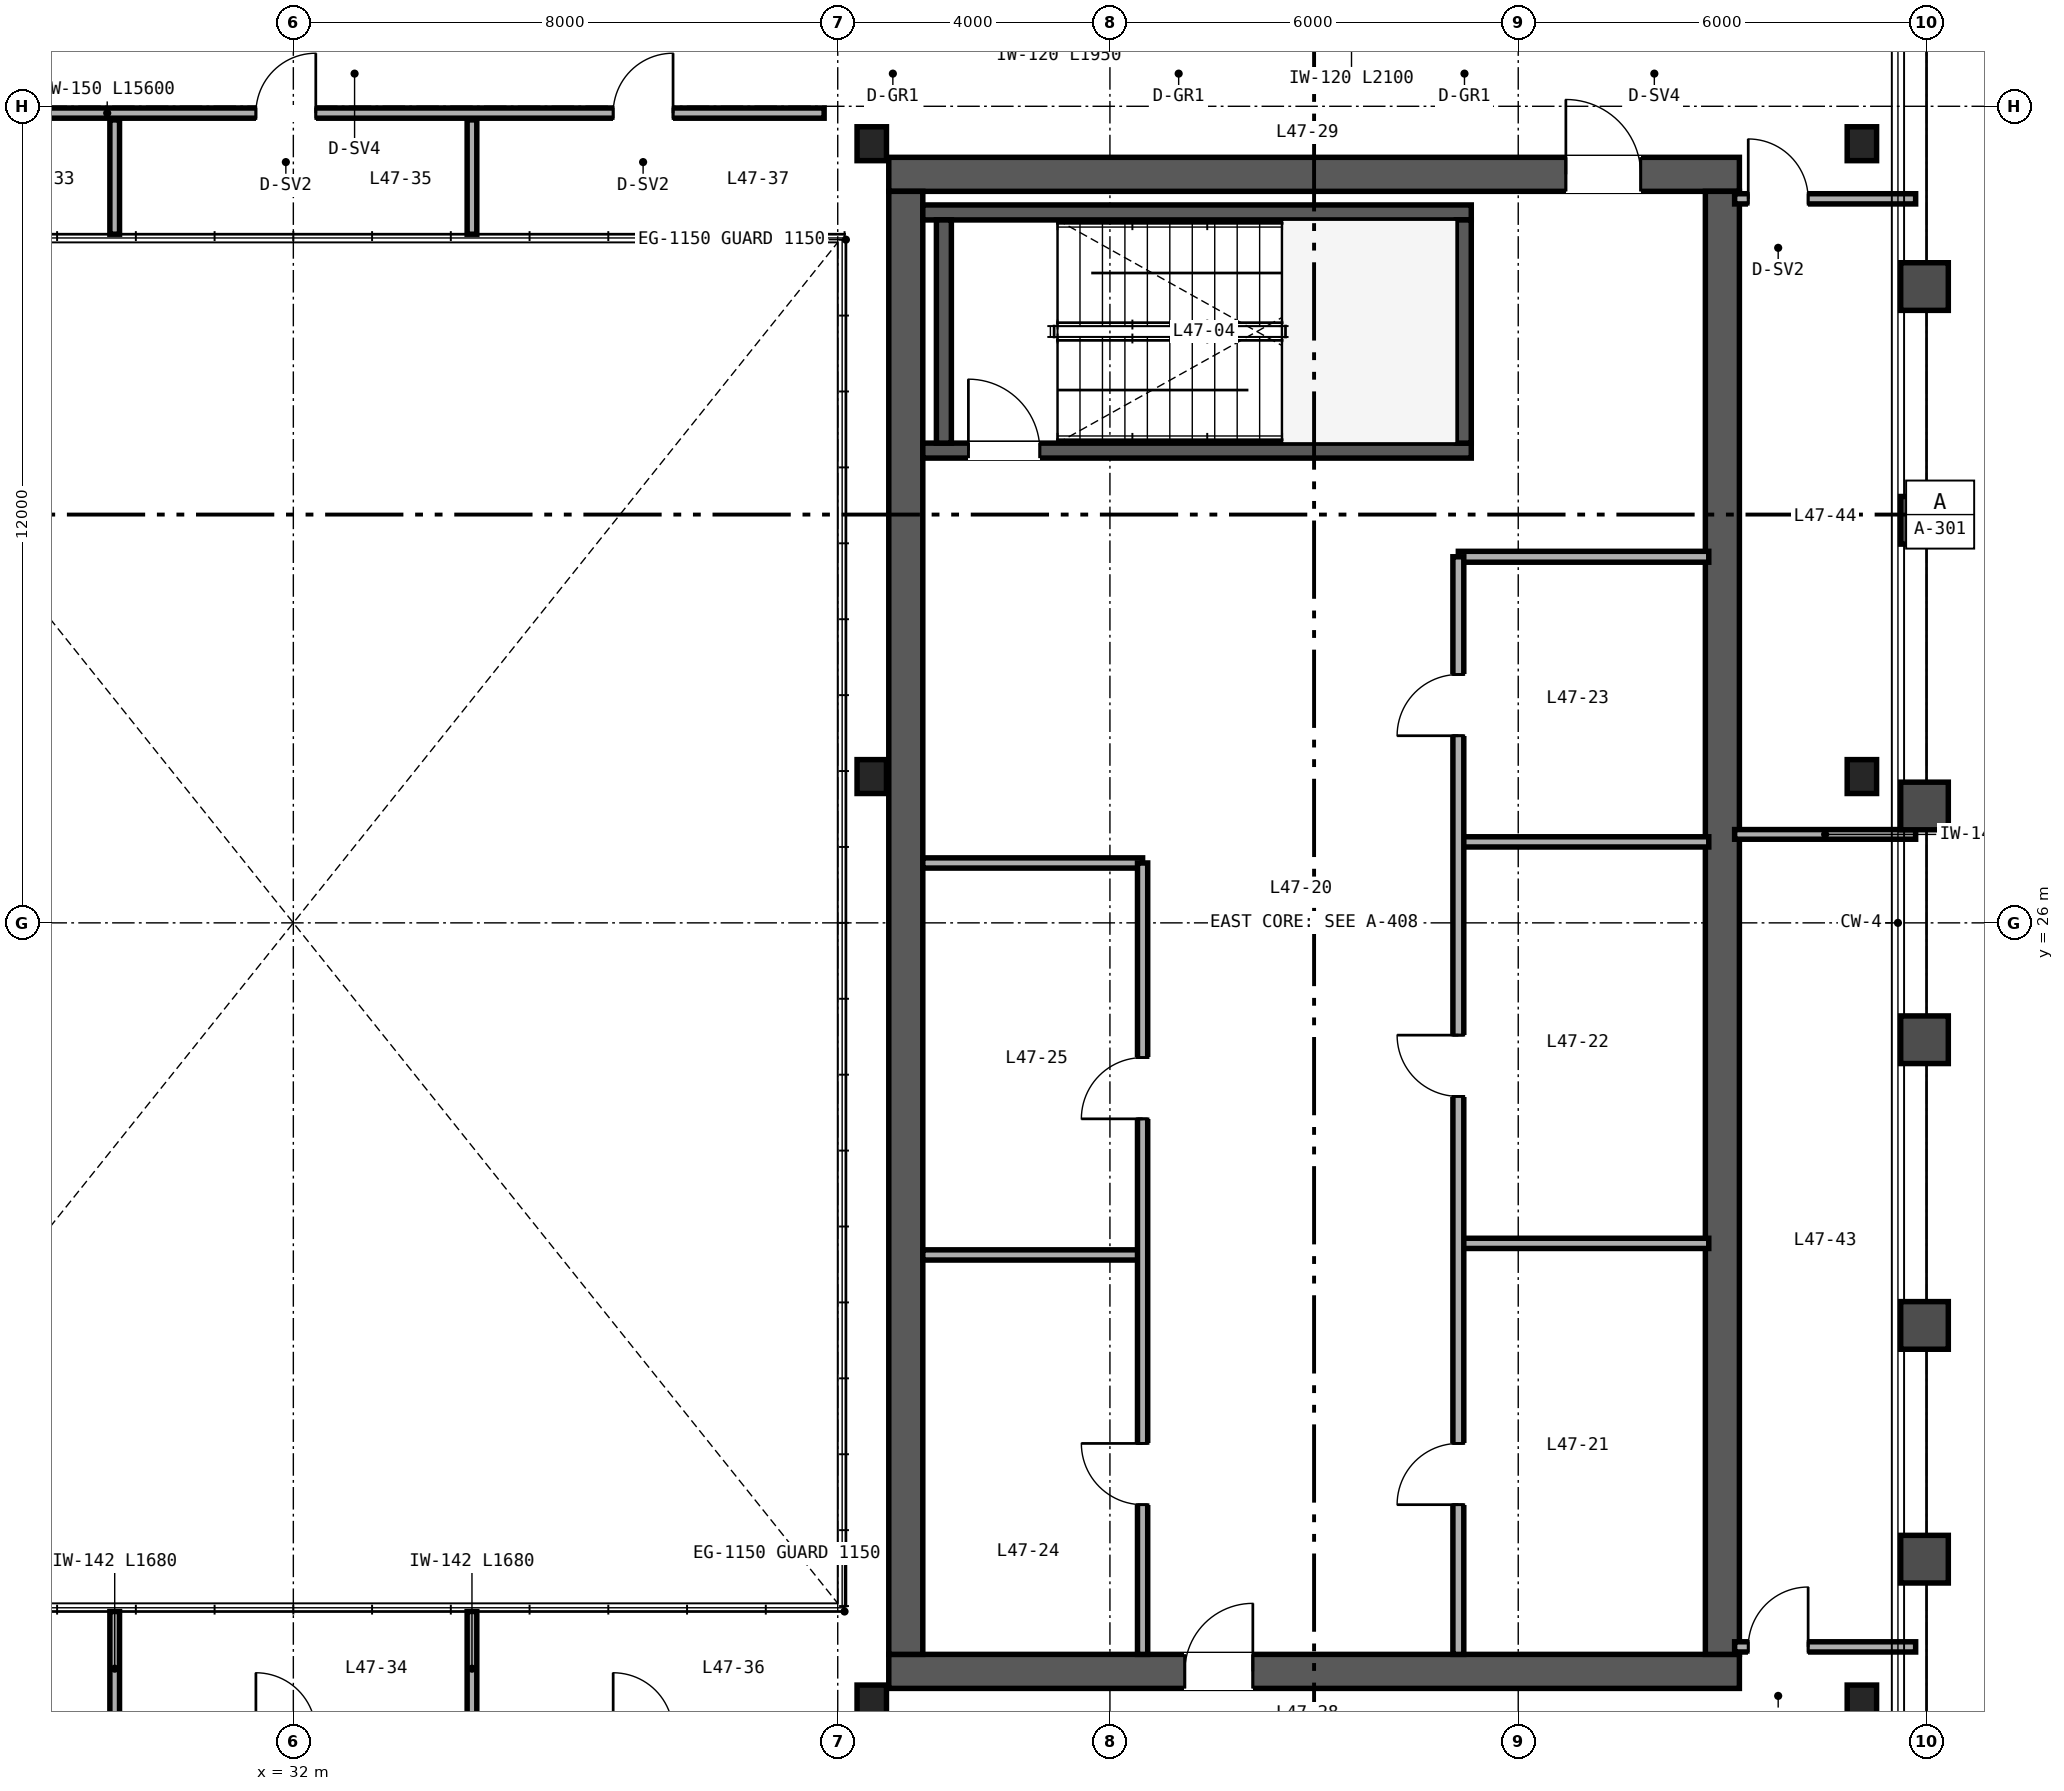
"""IFC4 building model, lengths in metres.
Left out: names, types, materials, properties, quantities, classifications, styles, units other than length and angle.
Written with IfcOpenShell. Run it as: python <this file> out.ifc"""

import sys

from ifc_helpers import new_model, si_unit, direction, frame, frame_2d, origin, origin_2d, place, context, subcontext, project, spatial, rectangle, i_section, extrude, source, transform, mapped, element, fill, save


model = new_model("IFC4")
c1 = context("Model", 3, precision=1e-05, world=origin(), true_north=direction((0.0, 1.0)))
c2 = subcontext(c1, "Body", "Model", "MODEL_VIEW")
j1 = project(units=[si_unit("LENGTHUNIT", "METRE"), si_unit("PLANEANGLEUNIT", "RADIAN")], contexts=[c1])
p1 = place(None, origin())
s1 = spatial("IfcSite", under=j1, at=p1, CompositionType="ELEMENT")
p2 = place(p1, origin())
s2 = spatial("IfcBuilding", under=s1, at=p2, CompositionType="ELEMENT")
p3 = place(p2, frame((0.0, 0.0, 188.4)))
s3 = spatial("IfcBuildingStorey", under=s2, at=p3, CompositionType="ELEMENT", Elevation=188.4)
p4 = place(p3, frame((40.75, 15.0, 0.0), z_axis=(0.0, 0.0, 1.0), x_axis=(1.0, 0.0, 0.0)))
e1 = element("IfcWall", 1, at=p4, inside=s3, PredefinedType="SHEAR", context=c2, shape_type="SweptSolid", body=[
    extrude(rectangle(XDim=12.5, YDim=0.5, at=frame_2d((6.25, 0.0))), origin(), (0.0, 0.0, 1.0), 3.37),
])
p5 = place(p4, frame((4.35, 0.0, 0.0)))
e2 = element("IfcOpeningElement", 2, at=p5, cuts=e1, PredefinedType="OPENING", context=c2, shape_type="SweptSolid", body=[
    extrude(rectangle(XDim=1.0, YDim=2.15, at=frame_2d((0.5, 1.075))), frame((0.0, 0.26, 0.0), z_axis=(0.0, -1.0, 0.0), x_axis=(1.0, 0.0, 0.0)), (0.0, 0.0, 1.0), 0.52),
])
p6 = place(p3, frame((40.75, 37.0, 0.0), z_axis=(0.0, 0.0, 1.0), x_axis=(1.0, 0.0, 0.0)))
e3 = element("IfcWall", 3, at=p6, inside=s3, PredefinedType="SHEAR", context=c2, shape_type="SweptSolid", body=[
    extrude(rectangle(XDim=12.5, YDim=0.5, at=frame_2d((6.25, 0.0))), origin(), (0.0, 0.0, 1.0), 3.37),
])
p7 = place(p6, frame((9.95, 0.0, 0.0)))
e4 = element("IfcOpeningElement", 4, at=p7, cuts=e3, PredefinedType="OPENING", context=c2, shape_type="SweptSolid", body=[
    extrude(rectangle(XDim=1.1, YDim=2.15, at=frame_2d((0.55, 1.075))), frame((0.0, 0.26, 0.0), z_axis=(0.0, -1.0, 0.0), x_axis=(1.0, 0.0, 0.0)), (0.0, 0.0, 1.0), 0.52),
])
for number, where, z_axis, x_axis in (
    (5, (41.0, 15.25, 0.0), (0.0, 0.0, 1.0), (0.0, 1.0, 0.0)),
    (6, (53.0, 15.25, 0.0), (0.0, 0.0, 1.0), (0.0, 1.0, 0.0)),
):
    element("IfcWall", number, at=place(p3, frame(where, z_axis=z_axis, x_axis=x_axis)), inside=s3, PredefinedType="SHEAR", context=c2, shape_type="SweptSolid", body=[
        extrude(rectangle(XDim=21.5, YDim=0.5, at=frame_2d((10.75, 0.0))), origin(), (0.0, 0.0, 1.0), 3.37),
    ])
p8 = place(p3, frame((41.25, 32.94, 0.0), z_axis=(0.0, 0.0, 1.0), x_axis=(1.0, 0.0, 0.0)))
e7 = element("IfcWall", 7, at=p8, inside=s3, PredefinedType="SHEAR", context=c2, shape_type="SweptSolid", body=[
    extrude(rectangle(XDim=8.06, YDim=0.22, at=frame_2d((4.03, 0.0))), origin(), (0.0, 0.0, 1.0), 3.4),
])
p9 = place(p8, frame((0.67, 0.0, 0.0)))
e8 = element("IfcOpeningElement", 8, at=p9, cuts=e7, PredefinedType="OPENING", context=c2, shape_type="SweptSolid", body=[
    extrude(rectangle(XDim=1.05, YDim=2.15, at=frame_2d((0.525, 1.075))), frame((0.0, 0.12, 0.0), z_axis=(0.0, -1.0, 0.0), x_axis=(1.0, 0.0, 0.0)), (0.0, 0.0, 1.0), 0.24),
])
p10 = place(p3, frame((41.25, 36.44, 0.0), z_axis=(0.0, 0.0, 1.0), x_axis=(1.0, 0.0, 0.0)))
e9 = element("IfcWall", 9, at=p10, inside=s3, PredefinedType="SHEAR", context=c2, shape_type="SweptSolid", body=[
    extrude(rectangle(XDim=8.06, YDim=0.22, at=frame_2d((4.03, 0.0))), origin(), (0.0, 0.0, 1.0), 3.4),
])
for number, where, z_axis, x_axis in (
    (10, (41.56, 33.05, 0.0), (0.0, 0.0, 1.0), (0.0, 1.0, 0.0)),
    (11, (49.2, 33.05, 0.0), (0.0, 0.0, 1.0), (0.0, 1.0, 0.0)),
):
    element("IfcWall", number, at=place(p3, frame(where, z_axis=z_axis, x_axis=x_axis)), inside=s3, PredefinedType="SHEAR", context=c2, shape_type="SweptSolid", body=[
        extrude(rectangle(XDim=3.28, YDim=0.22, at=frame_2d((1.64, 0.0))), origin(), (0.0, 0.0, 1.0), 3.4),
    ])
m1 = source(origin(), c2, "Body", "SweptSolid", [
    extrude(i_section(OverallWidth=0.432, OverallDepth=0.498, WebThickness=0.056, FlangeThickness=0.089, FilletRadius=0.025, at=origin_2d()), origin(), (0.0, 0.0, 1.0), 3.37),
])
for number, where, z_axis, x_axis in (
    (12, (40.5, 14.55, 0.0), (0.0, 0.0, 1.0), (1.0, 0.0, 0.0)),
    (13, (55.05, 14.55, 0.0), (0.0, 0.0, 1.0), (1.0, 0.0, 0.0)),
    (14, (40.5, 28.15, 0.0), (0.0, 0.0, 1.0), (1.0, 0.0, 0.0)),
    (15, (55.05, 28.15, 0.0), (0.0, 0.0, 1.0), (1.0, 0.0, 0.0)),
    (16, (40.5, 37.45, 0.0), (0.0, 0.0, 1.0), (1.0, 0.0, 0.0)),
    (17, (55.05, 37.45, 0.0), (0.0, 0.0, 1.0), (1.0, 0.0, 0.0)),
):
    element("IfcColumn", number, at=place(p3, frame(where, z_axis=z_axis, x_axis=x_axis)), inside=s3, PredefinedType="COLUMN", context=c2, shape_type="MappedRepresentation", body=[
        mapped(m1, transform((0.0, 0.0, 0.0), scale=1.0)),
    ])
p11 = place(p3, frame((49.12, 31.38, 0.0), z_axis=(0.0, 0.0, 1.0), x_axis=(1.0, 0.0, 0.0)))
e18 = element("IfcWall", 18, at=p11, inside=s3, PredefinedType="PARTITIONING", context=c2, shape_type="SweptSolid", body=[
    extrude(rectangle(XDim=3.68, YDim=0.16, at=frame_2d((1.84, 0.0))), origin(), (0.0, 0.0, 1.0), 2.47),
])
for number, where, z_axis, x_axis in (
    (19, (49.12, 21.29, 0.0), (0.0, 0.0, 1.0), (1.0, 0.0, 0.0)),
    (20, (49.12, 27.19, 0.0), (0.0, 0.0, 1.0), (1.0, 0.0, 0.0)),
):
    element("IfcWall", number, at=place(p3, frame(where, z_axis=z_axis, x_axis=x_axis)), inside=s3, PredefinedType="PARTITIONING", context=c2, shape_type="SweptSolid", body=[
        extrude(rectangle(XDim=3.68, YDim=0.15, at=frame_2d((1.84, 0.0))), origin(), (0.0, 0.0, 1.0), 3.37),
    ])
p12 = place(p3, frame((49.12, 15.25, 0.0), z_axis=(0.0, 0.0, 1.0), x_axis=(0.0, 1.0, 0.0)))
e21 = element("IfcWall", 21, at=p12, inside=s3, PredefinedType="PARTITIONING", context=c2, shape_type="SweptSolid", body=[
    extrude(rectangle(XDim=16.13, YDim=0.16, at=frame_2d((8.065, 0.0))), origin(), (0.0, 0.0, 1.0), 2.443),
])
p13 = place(p12, frame((2.2, 0.0, 0.0)))
e22 = element("IfcOpeningElement", 22, at=p13, cuts=e21, PredefinedType="OPENING", context=c2, shape_type="SweptSolid", body=[
    extrude(rectangle(XDim=0.9, YDim=2.15, at=frame_2d((0.45, 1.075))), frame((0.0, 0.09, 0.0), z_axis=(0.0, -1.0, 0.0), x_axis=(1.0, 0.0, 0.0)), (0.0, 0.0, 1.0), 0.18),
])
p14 = place(p12, frame((8.2, 0.0, 0.0)))
e23 = element("IfcOpeningElement", 23, at=p14, cuts=e21, PredefinedType="OPENING", context=c2, shape_type="SweptSolid", body=[
    extrude(rectangle(XDim=0.9, YDim=2.15, at=frame_2d((0.45, 1.075))), frame((0.0, 0.09, 0.0), z_axis=(0.0, -1.0, 0.0), x_axis=(1.0, 0.0, 0.0)), (0.0, 0.0, 1.0), 0.18),
])
p15 = place(p12, frame((13.5, 0.0, 0.0)))
e24 = element("IfcOpeningElement", 24, at=p15, cuts=e21, PredefinedType="OPENING", context=c2, shape_type="SweptSolid", body=[
    extrude(rectangle(XDim=0.9, YDim=2.15, at=frame_2d((0.45, 1.075))), frame((0.0, 0.09, 0.0), z_axis=(0.0, -1.0, 0.0), x_axis=(1.0, 0.0, 0.0)), (0.0, 0.0, 1.0), 0.18),
])
for number, where, z_axis, x_axis in (
    (25, (41.25, 26.88, 0.0), (0.0, 0.0, 1.0), (1.0, 0.0, 0.0)),
    (26, (41.25, 21.12, 0.0), (0.0, 0.0, 1.0), (1.0, 0.0, 0.0)),
):
    element("IfcWall", number, at=place(p3, frame(where, z_axis=z_axis, x_axis=x_axis)), inside=s3, PredefinedType="PARTITIONING", context=c2, shape_type="SweptSolid", body=[
        extrude(rectangle(XDim=3.23, YDim=0.15, at=frame_2d((1.615, 0.0))), origin(), (0.0, 0.0, 1.0), 3.37),
    ])
p16 = place(p3, frame((44.48, 15.25, 0.0), z_axis=(0.0, 0.0, 1.0), x_axis=(0.0, 1.0, 0.0)))
e27 = element("IfcWall", 27, at=p16, inside=s3, PredefinedType="PARTITIONING", context=c2, shape_type="SweptSolid", body=[
    extrude(rectangle(XDim=11.63, YDim=0.15, at=frame_2d((5.815, 0.0))), origin(), (0.0, 0.0, 1.0), 3.37),
])
p17 = place(p16, frame((2.2, 0.0, 0.0)))
e28 = element("IfcOpeningElement", 28, at=p17, cuts=e27, PredefinedType="OPENING", context=c2, shape_type="SweptSolid", body=[
    extrude(rectangle(XDim=0.9, YDim=2.15, at=frame_2d((0.45, 1.075))), frame((0.0, 0.085, 0.0), z_axis=(0.0, -1.0, 0.0), x_axis=(1.0, 0.0, 0.0)), (0.0, 0.0, 1.0), 0.17),
])
p18 = place(p16, frame((7.87, 0.0, 0.0)))
e29 = element("IfcOpeningElement", 29, at=p18, cuts=e27, PredefinedType="OPENING", context=c2, shape_type="SweptSolid", body=[
    extrude(rectangle(XDim=0.9, YDim=2.15, at=frame_2d((0.45, 1.075))), frame((0.0, 0.085, 0.0), z_axis=(0.0, -1.0, 0.0), x_axis=(1.0, 0.0, 0.0)), (0.0, 0.0, 1.0), 0.17),
])
p19 = place(p3, frame((24.2, 37.9, 0.0), z_axis=(0.0, 0.0, 1.0), x_axis=(1.0, 0.0, 0.0)))
e30 = element("IfcWall", 30, at=p19, inside=s3, PredefinedType="PARTITIONING", context=c2, shape_type="SweptSolid", body=[
    extrude(rectangle(XDim=15.6, YDim=0.15, at=frame_2d((7.8, 0.0))), origin(), (0.0, 0.0, 1.0), 3.37),
])
p20 = place(p19, frame((2.0, 0.0, 0.0)))
e31 = element("IfcOpeningElement", 31, at=p20, cuts=e30, PredefinedType="OPENING", context=c2, shape_type="SweptSolid", body=[
    extrude(rectangle(XDim=0.88, YDim=2.15, at=frame_2d((0.44, 1.075))), frame((0.0, 0.085, 0.0), z_axis=(0.0, -1.0, 0.0), x_axis=(1.0, 0.0, 0.0)), (0.0, 0.0, 1.0), 0.17),
])
p21 = place(p19, frame((7.25, 0.0, 0.0)))
e32 = element("IfcOpeningElement", 32, at=p21, cuts=e30, PredefinedType="OPENING", context=c2, shape_type="SweptSolid", body=[
    extrude(rectangle(XDim=0.88, YDim=2.15, at=frame_2d((0.44, 1.075))), frame((0.0, 0.085, 0.0), z_axis=(0.0, -1.0, 0.0), x_axis=(1.0, 0.0, 0.0)), (0.0, 0.0, 1.0), 0.17),
])
p22 = place(p19, frame((12.5, 0.0, 0.0)))
e33 = element("IfcOpeningElement", 33, at=p22, cuts=e30, PredefinedType="OPENING", context=c2, shape_type="SweptSolid", body=[
    extrude(rectangle(XDim=0.88, YDim=2.15, at=frame_2d((0.44, 1.075))), frame((0.0, 0.085, 0.0), z_axis=(0.0, -1.0, 0.0), x_axis=(1.0, 0.0, 0.0)), (0.0, 0.0, 1.0), 0.17),
])
for number, where, z_axis, x_axis in (
    (34, (29.375, 14.2, 0.0), (0.0, 0.0, 1.0), (0.0, 1.0, 0.0)),
    (35, (29.375, 36.12, 0.0), (0.0, 0.0, 1.0), (0.0, 1.0, 0.0)),
    (36, (34.625, 14.2, 0.0), (0.0, 0.0, 1.0), (0.0, 1.0, 0.0)),
    (37, (34.625, 36.12, 0.0), (0.0, 0.0, 1.0), (0.0, 1.0, 0.0)),
):
    element("IfcWall", number, at=place(p3, frame(where, z_axis=z_axis, x_axis=x_axis)), inside=s3, PredefinedType="PARTITIONING", context=c2, shape_type="SweptSolid", body=[
        extrude(rectangle(XDim=1.68, YDim=0.142, at=frame_2d((0.84, 0.0))), origin(), (0.0, 0.0, 1.0), 3.37),
    ])
p23 = place(p3, frame((53.18, 15.36, 0.0), z_axis=(0.0, 0.0, 1.0), x_axis=(1.0, 0.0, 0.0)))
e38 = element("IfcWall", 38, at=p23, inside=s3, PredefinedType="PARTITIONING", context=c2, shape_type="SweptSolid", body=[
    extrude(rectangle(XDim=2.66, YDim=0.15, at=frame_2d((1.33, 0.0))), origin(), (0.0, 0.0, 1.0), 2.591),
])
p24 = place(p23, frame((0.2, 0.0, 0.0)))
e39 = element("IfcOpeningElement", 39, at=p24, cuts=e38, PredefinedType="OPENING", context=c2, shape_type="SweptSolid", body=[
    extrude(rectangle(XDim=0.88, YDim=2.15, at=frame_2d((0.44, 1.075))), frame((0.0, 0.085, 0.0), z_axis=(0.0, -1.0, 0.0), x_axis=(1.0, 0.0, 0.0)), (0.0, 0.0, 1.0), 0.17),
])
p25 = place(p3, frame((53.18, 36.64, 0.0), z_axis=(0.0, 0.0, 1.0), x_axis=(1.0, 0.0, 0.0)))
e40 = element("IfcWall", 40, at=p25, inside=s3, PredefinedType="PARTITIONING", context=c2, shape_type="SweptSolid", body=[
    extrude(rectangle(XDim=2.66, YDim=0.15, at=frame_2d((1.33, 0.0))), origin(), (0.0, 0.0, 1.0), 2.753),
])
p26 = place(p25, frame((0.2, 0.0, 0.0)))
e41 = element("IfcOpeningElement", 41, at=p26, cuts=e40, PredefinedType="OPENING", context=c2, shape_type="SweptSolid", body=[
    extrude(rectangle(XDim=0.88, YDim=2.15, at=frame_2d((0.44, 1.075))), frame((0.0, 0.085, 0.0), z_axis=(0.0, -1.0, 0.0), x_axis=(1.0, 0.0, 0.0)), (0.0, 0.0, 1.0), 0.17),
])
p27 = place(p3, frame((53.18, 27.3, 0.0), z_axis=(0.0, 0.0, 1.0), x_axis=(1.0, 0.0, 0.0)))
e42 = element("IfcWall", 42, at=p27, inside=s3, PredefinedType="PARTITIONING", context=c2, shape_type="SweptSolid", body=[
    extrude(rectangle(XDim=2.66, YDim=0.142, at=frame_2d((1.33, 0.0))), origin(), (0.0, 0.0, 1.0), 2.591),
])
m2 = source(origin(), c2, "Body", "SweptSolid", [
    extrude(rectangle(XDim=1.05, YDim=2.15, at=frame_2d((0.525, 1.075))), frame((0.0, 0.025, 0.0), z_axis=(0.0, -1.0, 0.0), x_axis=(1.0, 0.0, 0.0)), (0.0, 0.0, 1.0), 0.05),
])
p28 = place(p9, origin())
e43 = element("IfcDoor", 43, at=p28, inside=s3, OperationType="SINGLE_SWING_LEFT", PredefinedType="DOOR", context=c2, shape_type="MappedRepresentation", body=[
    mapped(m2, transform((0.0, 0.0, 0.0), scale=1.0)),
])
fill(e8, e43)
m3 = source(origin(), c2, "Body", "SweptSolid", [
    extrude(rectangle(XDim=1.0, YDim=2.15, at=frame_2d((0.5, 1.075))), frame((0.0, 0.025, 0.0), z_axis=(0.0, -1.0, 0.0), x_axis=(1.0, 0.0, 0.0)), (0.0, 0.0, 1.0), 0.05),
])
p29 = place(p5, origin())
e44 = element("IfcDoor", 44, at=p29, inside=s3, OperationType="SINGLE_SWING_RIGHT", PredefinedType="DOOR", context=c2, shape_type="MappedRepresentation", body=[
    mapped(m3, transform((0.0, 0.0, 0.0), scale=1.0)),
])
fill(e2, e44)
m4 = source(origin(), c2, "Body", "SweptSolid", [
    extrude(rectangle(XDim=1.1, YDim=2.15, at=frame_2d((0.55, 1.075))), frame((0.0, 0.025, 0.0), z_axis=(0.0, -1.0, 0.0), x_axis=(1.0, 0.0, 0.0)), (0.0, 0.0, 1.0), 0.05),
])
p30 = place(p7, origin())
e45 = element("IfcDoor", 45, at=p30, inside=s3, OperationType="SINGLE_SWING_LEFT", PredefinedType="DOOR", context=c2, shape_type="MappedRepresentation", body=[
    mapped(m4, transform((0.0, 0.0, 0.0), scale=1.0)),
])
fill(e4, e45)
m5 = source(origin(), c2, "Body", "SweptSolid", [
    extrude(rectangle(XDim=0.9, YDim=2.15, at=frame_2d((0.45, 1.075))), frame((0.0, 0.025, 0.0), z_axis=(0.0, -1.0, 0.0), x_axis=(1.0, 0.0, 0.0)), (0.0, 0.0, 1.0), 0.05),
])
p31 = place(p13, origin())
e46 = element("IfcDoor", 46, at=p31, inside=s3, OperationType="SINGLE_SWING_LEFT", PredefinedType="DOOR", context=c2, shape_type="MappedRepresentation", body=[
    mapped(m5, transform((0.0, 0.0, 0.0), scale=1.0)),
])
fill(e22, e46)
p32 = place(p14, origin())
e47 = element("IfcDoor", 47, at=p32, inside=s3, OperationType="SINGLE_SWING_RIGHT", PredefinedType="DOOR", context=c2, shape_type="MappedRepresentation", body=[
    mapped(m5, transform((0.0, 0.0, 0.0), scale=1.0)),
])
fill(e23, e47)
p33 = place(p15, origin())
e48 = element("IfcDoor", 48, at=p33, inside=s3, OperationType="SINGLE_SWING_LEFT", PredefinedType="DOOR", context=c2, shape_type="MappedRepresentation", body=[
    mapped(m5, transform((0.0, 0.0, 0.0), scale=1.0)),
])
fill(e24, e48)
p34 = place(p17, origin())
e49 = element("IfcDoor", 49, at=p34, inside=s3, OperationType="SINGLE_SWING_RIGHT", PredefinedType="DOOR", context=c2, shape_type="MappedRepresentation", body=[
    mapped(m5, transform((0.0, 0.0, 0.0), scale=1.0)),
])
fill(e28, e49)
p35 = place(p18, origin())
e50 = element("IfcDoor", 50, at=p35, inside=s3, OperationType="SINGLE_SWING_LEFT", PredefinedType="DOOR", context=c2, shape_type="MappedRepresentation", body=[
    mapped(m5, transform((0.0, 0.0, 0.0), scale=1.0)),
])
fill(e29, e50)
m6 = source(origin(), c2, "Body", "SweptSolid", [
    extrude(rectangle(XDim=0.88, YDim=2.15, at=frame_2d((0.44, 1.075))), frame((0.0, 0.025, 0.0), z_axis=(0.0, -1.0, 0.0), x_axis=(1.0, 0.0, 0.0)), (0.0, 0.0, 1.0), 0.05),
])
p36 = place(p21, origin())
e51 = element("IfcDoor", 51, at=p36, inside=s3, OperationType="SINGLE_SWING_RIGHT", PredefinedType="DOOR", context=c2, shape_type="MappedRepresentation", body=[
    mapped(m6, transform((0.0, 0.0, 0.0), scale=1.0)),
])
fill(e32, e51)
p37 = place(p22, origin())
e52 = element("IfcDoor", 52, at=p37, inside=s3, OperationType="SINGLE_SWING_RIGHT", PredefinedType="DOOR", context=c2, shape_type="MappedRepresentation", body=[
    mapped(m6, transform((0.0, 0.0, 0.0), scale=1.0)),
])
fill(e33, e52)
p38 = place(p24, origin())
e53 = element("IfcDoor", 53, at=p38, inside=s3, OperationType="SINGLE_SWING_RIGHT", PredefinedType="DOOR", context=c2, shape_type="MappedRepresentation", body=[
    mapped(m6, transform((0.0, 0.0, 0.0), scale=1.0)),
])
fill(e39, e53)
p39 = place(p26, origin())
e54 = element("IfcDoor", 54, at=p39, inside=s3, OperationType="SINGLE_SWING_LEFT", PredefinedType="DOOR", context=c2, shape_type="MappedRepresentation", body=[
    mapped(m6, transform((0.0, 0.0, 0.0), scale=1.0)),
])
fill(e41, e54)
save(model, sys.argv[1])
